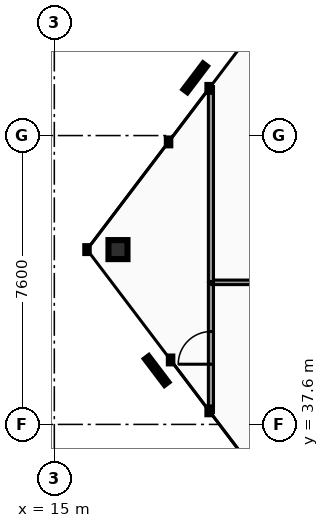
"""IFC4 building model, lengths in metres.
Left out: names, types, materials, properties, quantities, classifications, styles, units other than length and angle.
Written with IfcOpenShell. Run it as: python <this file> out.ifc"""

import sys

from ifc_helpers import new_model, si_unit, direction, frame, frame_2d, origin, origin_2d, place, context, subcontext, project, spatial, rectangle, hollow_rectangle, extrude, element, fill, save


model = new_model("IFC4")
c1 = context("Model", 3, precision=1e-05, world=origin(), true_north=direction((0.0, 1.0)))
c2 = subcontext(c1, "Body", "Model", "MODEL_VIEW")
j1 = project(units=[si_unit("LENGTHUNIT", "METRE"), si_unit("PLANEANGLEUNIT", "RADIAN")], contexts=[c1])
p1 = place(None, origin())
s1 = spatial("IfcSite", under=j1, at=p1, CompositionType="ELEMENT")
p2 = place(p1, origin())
s2 = spatial("IfcBuilding", under=s1, at=p2, CompositionType="ELEMENT")
p3 = place(p2, frame((0.0, 0.0, 265.2)))
s3 = spatial("IfcBuildingStorey", under=s2, at=p3, CompositionType="ELEMENT", Elevation=265.2)
p4 = place(p3, frame((20.476, 47.217, 0.0), z_axis=(-0.05309458581, -0.036622239563, 0.997917720319), x_axis=(0.567788470093, -0.823174497436, 0.0)))
e1 = element("IfcColumn", 1, at=p4, inside=s3, PredefinedType="COLUMN", context=c2, shape_type="SweptSolid", body=[
    extrude(hollow_rectangle(XDim=0.5, YDim=0.5, WallThickness=0.025, at=origin_2d()), origin(), (0.0, 0.0, 1.0), 3.187),
])
p5 = place(p3, frame((16.676, 42.199, 0.0), z_axis=(0.067003383853, 0.119252333578, 0.990600538809), x_axis=(-0.871813014788, 0.48983881762, 0.0)))
e2 = element("IfcColumn", 2, at=p5, inside=s3, PredefinedType="COLUMN", context=c2, shape_type="SweptSolid", body=[
    extrude(hollow_rectangle(XDim=0.5, YDim=0.5, WallThickness=0.025, at=origin_2d()), origin(), (0.0, 0.0, 1.0), 3.21),
])
p6 = place(p3, frame((19.122, 37.909, 0.0), z_axis=(0.0, 0.0, 1.0), x_axis=(0.0, 1.0, 0.0)))
e3 = element("IfcWall", 3, at=p6, inside=s3, PredefinedType="PARTITIONING", context=c2, shape_type="SweptSolid", body=[
    extrude(rectangle(XDim=3.409, YDim=0.135, at=frame_2d((1.705, 0.0))), origin(), (0.0, 0.0, 1.0), 2.235),
])
p7 = place(p6, frame((1.275, 0.0, 0.0)))
e4 = element("IfcOpeningElement", 4, at=p7, cuts=e3, PredefinedType="OPENING", context=c2, shape_type="SweptSolid", body=[
    extrude(rectangle(XDim=0.86, YDim=2.05, at=frame_2d((0.43, 1.025))), frame((0.0, 0.077, 0.0), z_axis=(0.0, -1.0, 0.0), x_axis=(1.0, 0.0, 0.0)), (0.0, 0.0, 1.0), 0.155),
])
p8 = place(p3, frame((19.142, 41.338, 0.0), z_axis=(0.0, 0.0, 1.0), x_axis=(1.0, 0.0, 0.0)))
e5 = element("IfcWall", 5, at=p8, inside=s3, PredefinedType="PARTITIONING", context=c2, shape_type="SweptSolid", body=[
    extrude(rectangle(XDim=4.142, YDim=0.12, at=frame_2d((2.071, 0.0))), origin(), (0.0, 0.0, 1.0), 2.235),
])
p9 = place(p3, frame((19.122, 41.358, 0.0), z_axis=(0.0, 0.0, 1.0), x_axis=(0.0, 1.0, 0.0)))
e6 = element("IfcWall", 6, at=p9, inside=s3, PredefinedType="PARTITIONING", context=c2, shape_type="SweptSolid", body=[
    extrude(rectangle(XDim=5.131, YDim=0.135, at=frame_2d((2.566, 0.0))), origin(), (0.0, 0.0, 1.0), 2.235),
])
p10 = place(p7, origin())
e7 = element("IfcDoor", 7, at=p10, inside=s3, OperationType="SINGLE_SWING_LEFT", PredefinedType="DOOR", context=c2, shape_type="SweptSolid", body=[
    extrude(rectangle(XDim=0.86, YDim=2.05, at=frame_2d((0.43, 1.025))), frame((0.0, 0.025, 0.0), z_axis=(0.0, -1.0, 0.0), x_axis=(1.0, 0.0, 0.0)), (0.0, 0.0, 1.0), 0.05),
])
fill(e4, e7)
save(model, sys.argv[1])
